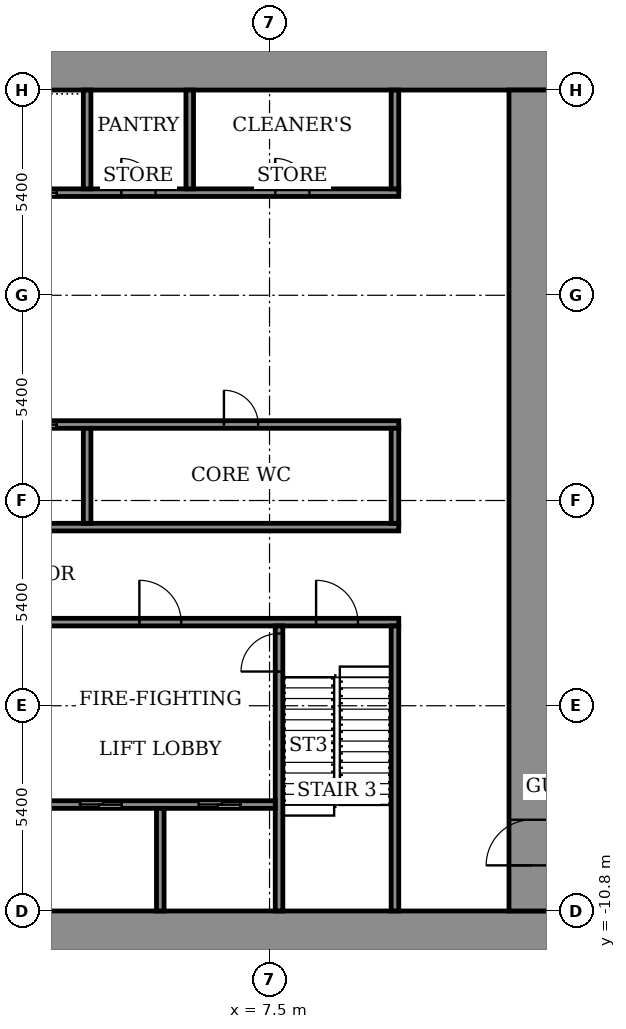
"""IFC4 building model, lengths in metres.
Left out: names, types, materials, properties, quantities, classifications, styles, units other than length and angle.
Written with IfcOpenShell. Run it as: python <this file> out.ifc"""

import sys

from ifc_helpers import new_model, si_unit, direction, frame, frame_2d, origin, place, context, subcontext, project, spatial, rectangle, extrude, element, fill, save


model = new_model("IFC4")
c1 = context("Model", 3, precision=1e-05, world=origin(), true_north=direction((0.0, 1.0)))
c2 = subcontext(c1, "Body", "Model", "MODEL_VIEW")
j1 = project(units=[si_unit("LENGTHUNIT", "METRE"), si_unit("PLANEANGLEUNIT", "RADIAN")], contexts=[c1])
p1 = place(None, origin())
s1 = spatial("IfcSite", under=j1, at=p1, CompositionType="ELEMENT")
p2 = place(p1, origin())
s2 = spatial("IfcBuilding", under=s1, at=p2, CompositionType="ELEMENT")
p3 = place(p2, frame((0.0, 0.0, 20.5)))
s3 = spatial("IfcBuildingStorey", under=s2, at=p3, CompositionType="ELEMENT", Elevation=20.5)
for number, where, z_axis, x_axis in (
    (1, (-15.0, -11.4, 0.0), (0.0, 0.0, 1.0), (1.0, 0.0, 0.0)),
    (2, (-15.0, 11.4, 0.0), (0.0, 0.0, 1.0), (1.0, 0.0, 0.0)),
):
    element("IfcWall", number, at=place(p3, frame(where, z_axis=z_axis, x_axis=x_axis)), inside=s3, PredefinedType="SHEAR", context=c2, shape_type="SweptSolid", body=[
        extrude(rectangle(XDim=30.0, YDim=1.2, at=frame_2d((15.0, 0.0))), origin(), (0.0, 0.0, 1.0), 4.5),
    ])
p4 = place(p3, frame((14.4, -10.8, 0.0), z_axis=(0.0, 0.0, 1.0), x_axis=(0.0, 1.0, 0.0)))
e3 = element("IfcWall", 3, at=p4, inside=s3, PredefinedType="SHEAR", context=c2, shape_type="SweptSolid", body=[
    extrude(rectangle(XDim=21.6, YDim=1.2, at=frame_2d((10.8, 0.0))), origin(), (0.0, 0.0, 1.0), 4.5),
])
p5 = place(p4, frame((1.2, 0.0, 0.0)))
e4 = element("IfcOpeningElement", 4, at=p5, cuts=e3, PredefinedType="OPENING", context=c2, shape_type="SweptSolid", body=[
    extrude(rectangle(XDim=1.2, YDim=2.1, at=frame_2d((0.6, 1.05))), frame((0.0, 0.61, 0.0), z_axis=(0.0, -1.0, 0.0), x_axis=(1.0, 0.0, 0.0)), (0.0, 0.0, 1.0), 1.22),
])
p6 = place(p3, frame((-10.9, -3.2, 0.0), z_axis=(0.0, 0.0, 1.0), x_axis=(1.0, 0.0, 0.0)))
e5 = element("IfcWall", 5, at=p6, inside=s3, PredefinedType="SHEAR", context=c2, shape_type="SweptSolid", body=[
    extrude(rectangle(XDim=21.8, YDim=0.2, at=frame_2d((10.9, 0.0))), origin(), (0.0, 0.0, 1.0), 3.95),
])
p7 = place(p6, frame((1.075, 0.0, 0.0)))
e6 = element("IfcOpeningElement", 6, at=p7, cuts=e5, PredefinedType="OPENING", context=c2, shape_type="SweptSolid", body=[
    extrude(rectangle(XDim=1.1, YDim=2.1, at=frame_2d((0.55, 1.05))), frame((0.0, 0.11, 0.0), z_axis=(0.0, -1.0, 0.0), x_axis=(1.0, 0.0, 0.0)), (0.0, 0.0, 1.0), 0.22),
])
p8 = place(p6, frame((10.325, 0.0, 0.0)))
e7 = element("IfcOpeningElement", 7, at=p8, cuts=e5, PredefinedType="OPENING", context=c2, shape_type="SweptSolid", body=[
    extrude(rectangle(XDim=1.1, YDim=2.1, at=frame_2d((0.55, 1.05))), frame((0.0, 0.11, 0.0), z_axis=(0.0, -1.0, 0.0), x_axis=(1.0, 0.0, 0.0)), (0.0, 0.0, 1.0), 0.22),
])
p9 = place(p6, frame((19.625, 0.0, 0.0)))
e8 = element("IfcOpeningElement", 8, at=p9, cuts=e5, PredefinedType="OPENING", context=c2, shape_type="SweptSolid", body=[
    extrude(rectangle(XDim=1.1, YDim=2.1, at=frame_2d((0.55, 1.05))), frame((0.0, 0.11, 0.0), z_axis=(0.0, -1.0, 0.0), x_axis=(1.0, 0.0, 0.0)), (0.0, 0.0, 1.0), 0.22),
])
p10 = place(p6, frame((5.7, 0.0, 0.0)))
e9 = element("IfcOpeningElement", 9, at=p10, cuts=e5, PredefinedType="OPENING", context=c2, shape_type="SweptSolid", body=[
    extrude(rectangle(XDim=1.1, YDim=2.1, at=frame_2d((0.55, 1.05))), frame((0.0, 0.11, 0.0), z_axis=(0.0, -1.0, 0.0), x_axis=(1.0, 0.0, 0.0)), (0.0, 0.0, 1.0), 0.22),
])
p11 = place(p6, frame((14.975, 0.0, 0.0)))
e10 = element("IfcOpeningElement", 10, at=p11, cuts=e5, PredefinedType="OPENING", context=c2, shape_type="SweptSolid", body=[
    extrude(rectangle(XDim=1.1, YDim=2.1, at=frame_2d((0.55, 1.05))), frame((0.0, 0.11, 0.0), z_axis=(0.0, -1.0, 0.0), x_axis=(1.0, 0.0, 0.0)), (0.0, 0.0, 1.0), 0.22),
])
p12 = place(p3, frame((-10.9, -0.7, 0.0), z_axis=(0.0, 0.0, 1.0), x_axis=(1.0, 0.0, 0.0)))
e11 = element("IfcWall", 11, at=p12, inside=s3, PredefinedType="SHEAR", context=c2, shape_type="SweptSolid", body=[
    extrude(rectangle(XDim=21.8, YDim=0.2, at=frame_2d((10.9, 0.0))), origin(), (0.0, 0.0, 1.0), 3.95),
])
p13 = place(p3, frame((-10.9, 2.0, 0.0), z_axis=(0.0, 0.0, 1.0), x_axis=(1.0, 0.0, 0.0)))
e12 = element("IfcWall", 12, at=p13, inside=s3, PredefinedType="SHEAR", context=c2, shape_type="SweptSolid", body=[
    extrude(rectangle(XDim=21.8, YDim=0.2, at=frame_2d((10.9, 0.0))), origin(), (0.0, 0.0, 1.0), 3.95),
])
p14 = place(p13, frame((0.9, 0.0, 0.0)))
e13 = element("IfcOpeningElement", 13, at=p14, cuts=e12, PredefinedType="OPENING", context=c2, shape_type="SweptSolid", body=[
    extrude(rectangle(XDim=1.1, YDim=2.1, at=frame_2d((0.55, 1.05))), frame((0.0, 0.11, 0.0), z_axis=(0.0, -1.0, 0.0), x_axis=(1.0, 0.0, 0.0)), (0.0, 0.0, 1.0), 0.22),
])
p15 = place(p13, frame((3.6, 0.0, 0.0)))
e14 = element("IfcOpeningElement", 14, at=p15, cuts=e12, PredefinedType="OPENING", context=c2, shape_type="SweptSolid", body=[
    extrude(rectangle(XDim=1.1, YDim=2.1, at=frame_2d((0.55, 1.05))), frame((0.0, 0.11, 0.0), z_axis=(0.0, -1.0, 0.0), x_axis=(1.0, 0.0, 0.0)), (0.0, 0.0, 1.0), 0.22),
])
p16 = place(p13, frame((6.3, 0.0, 0.0)))
e15 = element("IfcOpeningElement", 15, at=p16, cuts=e12, PredefinedType="OPENING", context=c2, shape_type="SweptSolid", body=[
    extrude(rectangle(XDim=1.1, YDim=2.1, at=frame_2d((0.55, 1.05))), frame((0.0, 0.11, 0.0), z_axis=(0.0, -1.0, 0.0), x_axis=(1.0, 0.0, 0.0)), (0.0, 0.0, 1.0), 0.22),
])
p17 = place(p13, frame((9.0, 0.0, 0.0)))
e16 = element("IfcOpeningElement", 16, at=p17, cuts=e12, PredefinedType="OPENING", context=c2, shape_type="SweptSolid", body=[
    extrude(rectangle(XDim=1.1, YDim=2.1, at=frame_2d((0.55, 1.05))), frame((0.0, 0.11, 0.0), z_axis=(0.0, -1.0, 0.0), x_axis=(1.0, 0.0, 0.0)), (0.0, 0.0, 1.0), 0.22),
])
p18 = place(p13, frame((11.7, 0.0, 0.0)))
e17 = element("IfcOpeningElement", 17, at=p18, cuts=e12, PredefinedType="OPENING", context=c2, shape_type="SweptSolid", body=[
    extrude(rectangle(XDim=1.1, YDim=2.1, at=frame_2d((0.55, 1.05))), frame((0.0, 0.11, 0.0), z_axis=(0.0, -1.0, 0.0), x_axis=(1.0, 0.0, 0.0)), (0.0, 0.0, 1.0), 0.22),
])
p19 = place(p13, frame((17.2, 0.0, 0.0)))
e18 = element("IfcOpeningElement", 18, at=p19, cuts=e12, PredefinedType="OPENING", context=c2, shape_type="SweptSolid", body=[
    extrude(rectangle(XDim=0.9, YDim=2.1, at=frame_2d((0.45, 1.05))), frame((0.0, 0.11, 0.0), z_axis=(0.0, -1.0, 0.0), x_axis=(1.0, 0.0, 0.0)), (0.0, 0.0, 1.0), 0.22),
])
p20 = place(p3, frame((-10.9, 8.1, 0.0), z_axis=(0.0, 0.0, 1.0), x_axis=(1.0, 0.0, 0.0)))
e19 = element("IfcWall", 19, at=p20, inside=s3, PredefinedType="SHEAR", context=c2, shape_type="SweptSolid", body=[
    extrude(rectangle(XDim=21.8, YDim=0.2, at=frame_2d((10.9, 0.0))), origin(), (0.0, 0.0, 1.0), 3.95),
])
p21 = place(p20, frame((0.9, 0.0, 0.0)))
e20 = element("IfcOpeningElement", 20, at=p21, cuts=e19, PredefinedType="OPENING", context=c2, shape_type="SweptSolid", body=[
    extrude(rectangle(XDim=1.1, YDim=2.1, at=frame_2d((0.55, 1.05))), frame((0.0, 0.11, 0.0), z_axis=(0.0, -1.0, 0.0), x_axis=(1.0, 0.0, 0.0)), (0.0, 0.0, 1.0), 0.22),
])
p22 = place(p20, frame((3.6, 0.0, 0.0)))
e21 = element("IfcOpeningElement", 21, at=p22, cuts=e19, PredefinedType="OPENING", context=c2, shape_type="SweptSolid", body=[
    extrude(rectangle(XDim=1.1, YDim=2.1, at=frame_2d((0.55, 1.05))), frame((0.0, 0.11, 0.0), z_axis=(0.0, -1.0, 0.0), x_axis=(1.0, 0.0, 0.0)), (0.0, 0.0, 1.0), 0.22),
])
p23 = place(p20, frame((6.3, 0.0, 0.0)))
e22 = element("IfcOpeningElement", 22, at=p23, cuts=e19, PredefinedType="OPENING", context=c2, shape_type="SweptSolid", body=[
    extrude(rectangle(XDim=1.1, YDim=2.1, at=frame_2d((0.55, 1.05))), frame((0.0, 0.11, 0.0), z_axis=(0.0, -1.0, 0.0), x_axis=(1.0, 0.0, 0.0)), (0.0, 0.0, 1.0), 0.22),
])
p24 = place(p20, frame((9.0, 0.0, 0.0)))
e23 = element("IfcOpeningElement", 23, at=p24, cuts=e19, PredefinedType="OPENING", context=c2, shape_type="SweptSolid", body=[
    extrude(rectangle(XDim=1.1, YDim=2.1, at=frame_2d((0.55, 1.05))), frame((0.0, 0.11, 0.0), z_axis=(0.0, -1.0, 0.0), x_axis=(1.0, 0.0, 0.0)), (0.0, 0.0, 1.0), 0.22),
])
p25 = place(p20, frame((11.7, 0.0, 0.0)))
e24 = element("IfcOpeningElement", 24, at=p25, cuts=e19, PredefinedType="OPENING", context=c2, shape_type="SweptSolid", body=[
    extrude(rectangle(XDim=1.1, YDim=2.1, at=frame_2d((0.55, 1.05))), frame((0.0, 0.11, 0.0), z_axis=(0.0, -1.0, 0.0), x_axis=(1.0, 0.0, 0.0)), (0.0, 0.0, 1.0), 0.22),
])
p26 = place(p20, frame((14.5, 0.0, 0.0)))
e25 = element("IfcOpeningElement", 25, at=p26, cuts=e19, PredefinedType="OPENING", context=c2, shape_type="SweptSolid", body=[
    extrude(rectangle(XDim=0.9, YDim=2.1, at=frame_2d((0.45, 1.05))), frame((0.0, 0.11, 0.0), z_axis=(0.0, -1.0, 0.0), x_axis=(1.0, 0.0, 0.0)), (0.0, 0.0, 1.0), 0.22),
])
p27 = place(p20, frame((18.55, 0.0, 0.0)))
e26 = element("IfcOpeningElement", 26, at=p27, cuts=e19, PredefinedType="OPENING", context=c2, shape_type="SweptSolid", body=[
    extrude(rectangle(XDim=0.9, YDim=2.1, at=frame_2d((0.45, 1.05))), frame((0.0, 0.11, 0.0), z_axis=(0.0, -1.0, 0.0), x_axis=(1.0, 0.0, 0.0)), (0.0, 0.0, 1.0), 0.22),
])
p28 = place(p3, frame((7.75, -10.8, 0.0), z_axis=(0.0, 0.0, 1.0), x_axis=(0.0, 1.0, 0.0)))
e27 = element("IfcWall", 27, at=p28, inside=s3, PredefinedType="SHEAR", context=c2, shape_type="SweptSolid", body=[
    extrude(rectangle(XDim=7.5, YDim=0.2, at=frame_2d((3.75, 0.0))), origin(), (0.0, 0.0, 1.0), 3.95),
])
p29 = place(p28, frame((6.3, 0.0, 0.0)))
e28 = element("IfcOpeningElement", 28, at=p29, cuts=e27, PredefinedType="OPENING", context=c2, shape_type="SweptSolid", body=[
    extrude(rectangle(XDim=1.0, YDim=2.1, at=frame_2d((0.5, 1.05))), frame((0.0, 0.11, 0.0), z_axis=(0.0, -1.0, 0.0), x_axis=(1.0, 0.0, 0.0)), (0.0, 0.0, 1.0), 0.22),
])
p30 = place(p3, frame((10.8, -10.8, 0.0), z_axis=(0.0, 0.0, 1.0), x_axis=(0.0, 1.0, 0.0)))
e29 = element("IfcWall", 29, at=p30, inside=s3, PredefinedType="SHEAR", context=c2, shape_type="SweptSolid", body=[
    extrude(rectangle(XDim=7.5, YDim=0.2, at=frame_2d((3.75, 0.0))), origin(), (0.0, 0.0, 1.0), 3.95),
])
p31 = place(p3, frame((1.6, -8.0, 0.0), z_axis=(0.0, 0.0, 1.0), x_axis=(1.0, 0.0, 0.0)))
e30 = element("IfcWall", 30, at=p31, inside=s3, PredefinedType="SHEAR", context=c2, shape_type="SweptSolid", body=[
    extrude(rectangle(XDim=6.05, YDim=0.2, at=frame_2d((3.025, 0.0))), origin(), (0.0, 0.0, 1.0), 3.95),
])
p32 = place(p31, frame((0.913, 0.0, 0.0)))
e31 = element("IfcOpeningElement", 31, at=p32, cuts=e30, PredefinedType="OPENING", context=c2, shape_type="SweptSolid", body=[
    extrude(rectangle(XDim=1.1, YDim=2.1, at=frame_2d((0.55, 1.05))), frame((0.0, 0.11, 0.0), z_axis=(0.0, -1.0, 0.0), x_axis=(1.0, 0.0, 0.0)), (0.0, 0.0, 1.0), 0.22),
])
p33 = place(p31, frame((4.038, 0.0, 0.0)))
e32 = element("IfcOpeningElement", 32, at=p33, cuts=e30, PredefinedType="OPENING", context=c2, shape_type="SweptSolid", body=[
    extrude(rectangle(XDim=1.1, YDim=2.1, at=frame_2d((0.55, 1.05))), frame((0.0, 0.11, 0.0), z_axis=(0.0, -1.0, 0.0), x_axis=(1.0, 0.0, 0.0)), (0.0, 0.0, 1.0), 0.22),
])
p34 = place(p3, frame((4.625, -10.8, 0.0), z_axis=(0.0, 0.0, 1.0), x_axis=(0.0, 1.0, 0.0)))
e33 = element("IfcWall", 33, at=p34, inside=s3, PredefinedType="SHEAR", context=c2, shape_type="SweptSolid", body=[
    extrude(rectangle(XDim=2.7, YDim=0.2, at=frame_2d((1.35, 0.0))), origin(), (0.0, 0.0, 1.0), 3.95),
])
p35 = place(p3, frame((2.7, -0.6, 0.0), z_axis=(0.0, 0.0, 1.0), x_axis=(0.0, 1.0, 0.0)))
e34 = element("IfcWall", 34, at=p35, inside=s3, PredefinedType="SHEAR", context=c2, shape_type="SweptSolid", body=[
    extrude(rectangle(XDim=2.5, YDim=0.2, at=frame_2d((1.25, 0.0))), origin(), (0.0, 0.0, 1.0), 3.95),
])
p36 = place(p3, frame((10.8, -0.6, 0.0), z_axis=(0.0, 0.0, 1.0), x_axis=(0.0, 1.0, 0.0)))
e35 = element("IfcWall", 35, at=p36, inside=s3, PredefinedType="STANDARD", context=c2, shape_type="SweptSolid", body=[
    extrude(rectangle(XDim=2.5, YDim=0.2, at=frame_2d((1.25, 0.0))), origin(), (0.0, 0.0, 1.0), 3.95),
])
p37 = place(p3, frame((2.7, 8.2, 0.0), z_axis=(0.0, 0.0, 1.0), x_axis=(0.0, 1.0, 0.0)))
e36 = element("IfcWall", 36, at=p37, inside=s3, PredefinedType="SHEAR", context=c2, shape_type="SweptSolid", body=[
    extrude(rectangle(XDim=2.6, YDim=0.2, at=frame_2d((1.3, 0.0))), origin(), (0.0, 0.0, 1.0), 3.95),
])
for number, where, z_axis, x_axis in (
    (37, (5.4, 8.2, 0.0), (0.0, 0.0, 1.0), (0.0, 1.0, 0.0)),
    (38, (10.8, 8.2, 0.0), (0.0, 0.0, 1.0), (0.0, 1.0, 0.0)),
):
    element("IfcWall", number, at=place(p3, frame(where, z_axis=z_axis, x_axis=x_axis)), inside=s3, PredefinedType="STANDARD", context=c2, shape_type="SweptSolid", body=[
        extrude(rectangle(XDim=2.6, YDim=0.2, at=frame_2d((1.3, 0.0))), origin(), (0.0, 0.0, 1.0), 3.95),
    ])
p38 = place(p5, origin())
e39 = element("IfcDoor", 39, at=p38, inside=s3, OperationType="DOUBLE_DOOR_SINGLE_SWING", PredefinedType="DOOR", context=c2, shape_type="SweptSolid", body=[
    extrude(rectangle(XDim=1.2, YDim=2.1, at=frame_2d((0.6, 1.05))), frame((0.0, 0.025, 0.0), z_axis=(0.0, -1.0, 0.0), x_axis=(1.0, 0.0, 0.0)), (0.0, 0.0, 1.0), 0.05),
])
fill(e4, e39)
p39 = place(p18, origin())
e40 = element("IfcDoor", 40, at=p39, inside=s3, OperationType="SLIDING_TO_LEFT", PredefinedType="DOOR", context=c2, shape_type="SweptSolid", body=[
    extrude(rectangle(XDim=1.1, YDim=2.1, at=frame_2d((0.55, 1.05))), frame((0.0, 0.025, 0.0), z_axis=(0.0, -1.0, 0.0), x_axis=(1.0, 0.0, 0.0)), (0.0, 0.0, 1.0), 0.05),
])
fill(e17, e40)
p40 = place(p25, origin())
e41 = element("IfcDoor", 41, at=p40, inside=s3, OperationType="SLIDING_TO_LEFT", PredefinedType="DOOR", context=c2, shape_type="SweptSolid", body=[
    extrude(rectangle(XDim=1.1, YDim=2.1, at=frame_2d((0.55, 1.05))), frame((0.0, 0.025, 0.0), z_axis=(0.0, -1.0, 0.0), x_axis=(1.0, 0.0, 0.0)), (0.0, 0.0, 1.0), 0.05),
])
fill(e24, e41)
p41 = place(p19, origin())
e42 = element("IfcDoor", 42, at=p41, inside=s3, OperationType="SINGLE_SWING_RIGHT", PredefinedType="DOOR", context=c2, shape_type="SweptSolid", body=[
    extrude(rectangle(XDim=0.9, YDim=2.1, at=frame_2d((0.45, 1.05))), frame((0.0, 0.025, 0.0), z_axis=(0.0, -1.0, 0.0), x_axis=(1.0, 0.0, 0.0)), (0.0, 0.0, 1.0), 0.05),
])
fill(e18, e42)
p42 = place(p26, origin())
e43 = element("IfcDoor", 43, at=p42, inside=s3, OperationType="SINGLE_SWING_RIGHT", PredefinedType="DOOR", context=c2, shape_type="SweptSolid", body=[
    extrude(rectangle(XDim=0.9, YDim=2.1, at=frame_2d((0.45, 1.05))), frame((0.0, 0.025, 0.0), z_axis=(0.0, -1.0, 0.0), x_axis=(1.0, 0.0, 0.0)), (0.0, 0.0, 1.0), 0.05),
])
fill(e25, e43)
p43 = place(p27, origin())
e44 = element("IfcDoor", 44, at=p43, inside=s3, OperationType="SINGLE_SWING_RIGHT", PredefinedType="DOOR", context=c2, shape_type="SweptSolid", body=[
    extrude(rectangle(XDim=0.9, YDim=2.1, at=frame_2d((0.45, 1.05))), frame((0.0, 0.025, 0.0), z_axis=(0.0, -1.0, 0.0), x_axis=(1.0, 0.0, 0.0)), (0.0, 0.0, 1.0), 0.05),
])
fill(e26, e44)
p44 = place(p32, origin())
e45 = element("IfcDoor", 45, at=p44, inside=s3, OperationType="SLIDING_TO_LEFT", PredefinedType="DOOR", context=c2, shape_type="SweptSolid", body=[
    extrude(rectangle(XDim=1.1, YDim=2.1, at=frame_2d((0.55, 1.05))), frame((0.0, 0.025, 0.0), z_axis=(0.0, -1.0, 0.0), x_axis=(1.0, 0.0, 0.0)), (0.0, 0.0, 1.0), 0.05),
])
fill(e31, e45)
p45 = place(p33, origin())
e46 = element("IfcDoor", 46, at=p45, inside=s3, OperationType="SLIDING_TO_LEFT", PredefinedType="DOOR", context=c2, shape_type="SweptSolid", body=[
    extrude(rectangle(XDim=1.1, YDim=2.1, at=frame_2d((0.55, 1.05))), frame((0.0, 0.025, 0.0), z_axis=(0.0, -1.0, 0.0), x_axis=(1.0, 0.0, 0.0)), (0.0, 0.0, 1.0), 0.05),
])
fill(e32, e46)
p46 = place(p9, origin())
e47 = element("IfcDoor", 47, at=p46, inside=s3, OperationType="SINGLE_SWING_RIGHT", PredefinedType="DOOR", context=c2, shape_type="SweptSolid", body=[
    extrude(rectangle(XDim=1.1, YDim=2.1, at=frame_2d((0.55, 1.05))), frame((0.0, 0.025, 0.0), z_axis=(0.0, -1.0, 0.0), x_axis=(1.0, 0.0, 0.0)), (0.0, 0.0, 1.0), 0.05),
])
fill(e8, e47)
p47 = place(p11, origin())
e48 = element("IfcDoor", 48, at=p47, inside=s3, OperationType="SINGLE_SWING_LEFT", PredefinedType="DOOR", context=c2, shape_type="SweptSolid", body=[
    extrude(rectangle(XDim=1.1, YDim=2.1, at=frame_2d((0.55, 1.05))), frame((0.0, 0.025, 0.0), z_axis=(0.0, -1.0, 0.0), x_axis=(1.0, 0.0, 0.0)), (0.0, 0.0, 1.0), 0.05),
])
fill(e10, e48)
p48 = place(p29, origin())
e49 = element("IfcDoor", 49, at=p48, inside=s3, OperationType="SINGLE_SWING_RIGHT", PredefinedType="DOOR", context=c2, shape_type="SweptSolid", body=[
    extrude(rectangle(XDim=1.0, YDim=2.1, at=frame_2d((0.5, 1.05))), frame((0.0, 0.025, 0.0), z_axis=(0.0, -1.0, 0.0), x_axis=(1.0, 0.0, 0.0)), (0.0, 0.0, 1.0), 0.05),
])
fill(e28, e49)
save(model, sys.argv[1])
